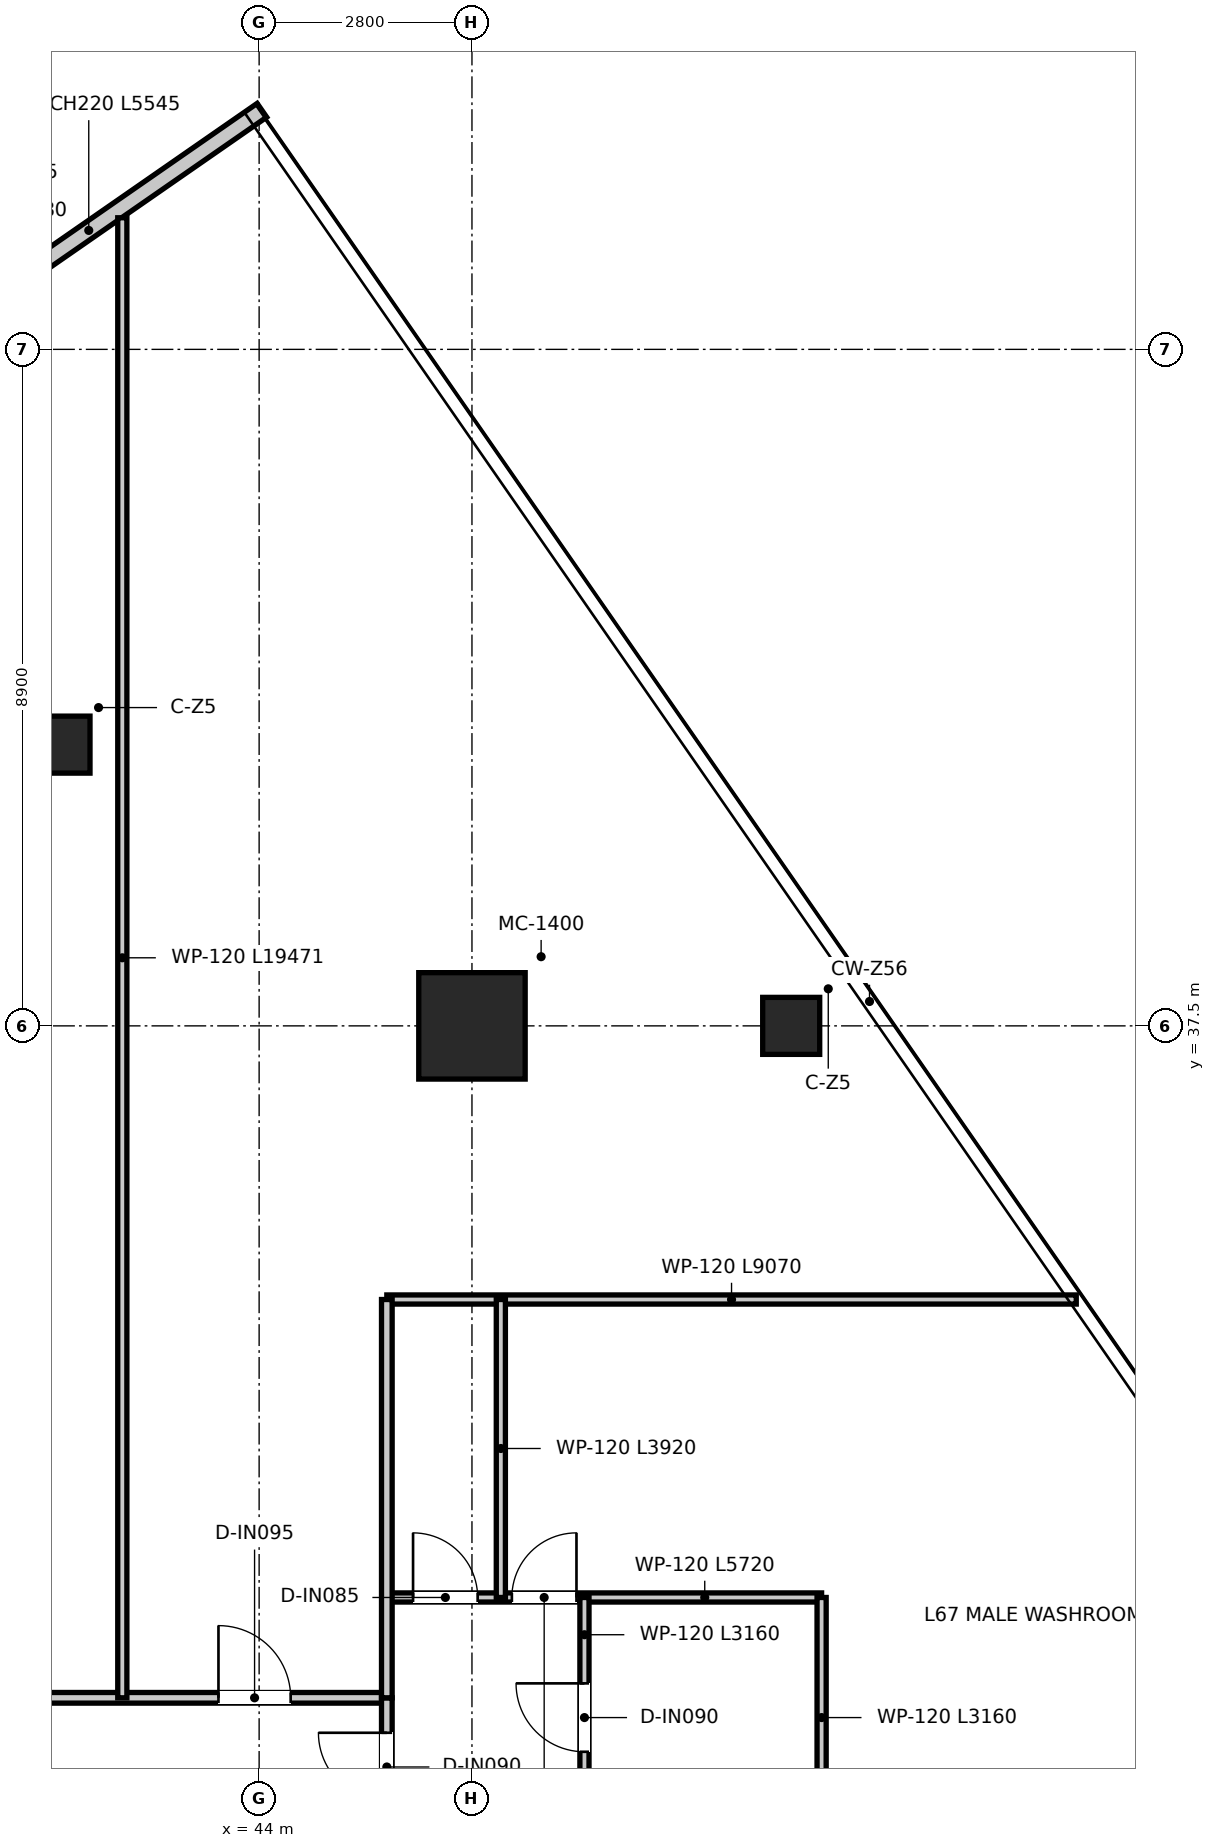
"""IFC4 building model, lengths in metres.
Left out: names, types, materials, properties, quantities, classifications, styles, units other than length and angle.
Written with IfcOpenShell. Run it as: python <this file> out.ifc"""

import sys

from ifc_helpers import new_model, si_unit, direction, frame, frame_2d, origin, origin_2d, place, context, subcontext, project, spatial, rectangle, extrude, source, transform, mapped, element, fill, save


model = new_model("IFC4")
c1 = context("Model", 3, precision=1e-05, world=origin(), true_north=direction((0.0, 1.0)))
c2 = subcontext(c1, "Body", "Model", "MODEL_VIEW")
j1 = project(units=[si_unit("LENGTHUNIT", "METRE"), si_unit("PLANEANGLEUNIT", "RADIAN")], contexts=[c1])
p1 = place(None, origin())
s1 = spatial("IfcSite", under=j1, at=p1, CompositionType="ELEMENT")
p2 = place(p1, origin())
s2 = spatial("IfcBuilding", under=s1, at=p2, CompositionType="ELEMENT")
p3 = place(p2, frame((0.0, 0.0, 275.3)))
s3 = spatial("IfcBuildingStorey", under=s2, at=p3, CompositionType="ELEMENT", Elevation=275.3)
m1 = source(origin(), c2, "Body", "SweptSolid", [
    extrude(rectangle(XDim=1.4, YDim=1.4, at=origin_2d()), origin(), (0.0, 0.0, 1.0), 3.95),
])
p4 = place(p3, frame((46.8, 37.5, 0.0), z_axis=(0.0, 0.0, 1.0), x_axis=(1.0, 0.0, 0.0)))
e1 = element("IfcColumn", 1, at=p4, inside=s3, PredefinedType="USERDEFINED", context=c2, shape_type="MappedRepresentation", body=[
    mapped(m1, transform((0.0, 0.0, 0.0), x_axis=(1.0, 0.0, 0.0), y_axis=(0.0, 1.0, 0.0), z_axis=(0.0, 0.0, 1.0), scale=1.0)),
])
m2 = source(origin(), c2, "Body", "SweptSolid", [
    extrude(rectangle(XDim=0.75, YDim=0.75, at=origin_2d()), origin(), (0.0, 0.0, 1.0), 3.95),
])
for number, where, z_axis, x_axis in (
    (2, (41.4, 41.2, 0.0), (0.0, 0.0, 1.0), (1.0, 0.0, 0.0)),
    (3, (51.0, 37.5, 0.0), (0.0, 0.0, 1.0), (1.0, 0.0, 0.0)),
):
    element("IfcColumn", number, at=place(p3, frame(where, z_axis=z_axis, x_axis=x_axis)), inside=s3, PredefinedType="COLUMN", context=c2, shape_type="MappedRepresentation", body=[
        mapped(m2, transform((0.0, 0.0, 0.0), x_axis=(1.0, 0.0, 0.0), y_axis=(0.0, 1.0, 0.0), z_axis=(0.0, 0.0, 1.0), scale=1.0)),
    ])
p5 = place(p3, frame((44.037, 49.545, 0.0), z_axis=(0.0, 0.0, 1.0), x_axis=(-0.821652918874, -0.569988141022, 0.0)))
e4 = element("IfcWall", 4, at=p5, inside=s3, PredefinedType="ELEMENTEDWALL", context=c2, shape_type="SweptSolid", body=[
    extrude(rectangle(XDim=5.545, YDim=0.22, at=frame_2d((2.772, 0.0))), origin(), (0.0, 0.0, 1.0), 3.67),
])
p6 = place(p3, frame((26.32, 28.66, 0.0), z_axis=(0.0, 0.0, 1.0), x_axis=(1.0, 0.0, 0.0)))
e5 = element("IfcWall", 5, at=p6, inside=s3, PredefinedType="PARTITIONING", context=c2, shape_type="SweptSolid", body=[
    extrude(rectangle(XDim=19.36, YDim=0.14, at=frame_2d((9.68, 0.0))), origin(), (0.0, 0.0, 1.0), 3.18),
])
p7 = place(p6, frame((1.265, 0.0, 0.0)))
e6 = element("IfcOpeningElement", 6, at=p7, cuts=e5, PredefinedType="OPENING", context=c2, shape_type="SweptSolid", body=[
    extrude(rectangle(XDim=0.95, YDim=2.1, at=frame_2d((0.475, 1.05))), frame((0.0, 0.08, 0.0), z_axis=(0.0, -1.0, 0.0), x_axis=(1.0, 0.0, 0.0)), (0.0, 0.0, 1.0), 0.16),
])
p8 = place(p6, frame((6.105, 0.0, 0.0)))
e7 = element("IfcOpeningElement", 7, at=p8, cuts=e5, PredefinedType="OPENING", context=c2, shape_type="SweptSolid", body=[
    extrude(rectangle(XDim=0.95, YDim=2.1, at=frame_2d((0.475, 1.05))), frame((0.0, 0.08, 0.0), z_axis=(0.0, -1.0, 0.0), x_axis=(1.0, 0.0, 0.0)), (0.0, 0.0, 1.0), 0.16),
])
p9 = place(p6, frame((12.305, 0.0, 0.0)))
e8 = element("IfcOpeningElement", 8, at=p9, cuts=e5, PredefinedType="OPENING", context=c2, shape_type="SweptSolid", body=[
    extrude(rectangle(XDim=0.95, YDim=2.1, at=frame_2d((0.475, 1.05))), frame((0.0, 0.08, 0.0), z_axis=(0.0, -1.0, 0.0), x_axis=(1.0, 0.0, 0.0)), (0.0, 0.0, 1.0), 0.16),
])
p10 = place(p6, frame((17.145, 0.0, 0.0)))
e9 = element("IfcOpeningElement", 9, at=p10, cuts=e5, PredefinedType="OPENING", context=c2, shape_type="SweptSolid", body=[
    extrude(rectangle(XDim=0.95, YDim=2.1, at=frame_2d((0.475, 1.05))), frame((0.0, 0.08, 0.0), z_axis=(0.0, -1.0, 0.0), x_axis=(1.0, 0.0, 0.0)), (0.0, 0.0, 1.0), 0.16),
])
p11 = place(p3, frame((45.68, 9.67, 0.0), z_axis=(0.0, 0.0, 1.0), x_axis=(0.0, 1.0, 0.0)))
e10 = element("IfcWall", 10, at=p11, inside=s3, PredefinedType="PARTITIONING", context=c2, shape_type="SweptSolid", body=[
    extrude(rectangle(XDim=18.99, YDim=0.14, at=frame_2d((9.495, 0.0))), origin(), (0.0, 0.0, 1.0), 3.13),
])
p12 = place(p11, frame((17.63, 0.0, 0.0)))
e11 = element("IfcOpeningElement", 11, at=p12, cuts=e10, PredefinedType="OPENING", context=c2, shape_type="SweptSolid", body=[
    extrude(rectangle(XDim=0.9, YDim=2.1, at=frame_2d((0.45, 1.05))), frame((0.0, 0.08, 0.0), z_axis=(0.0, -1.0, 0.0), x_axis=(1.0, 0.0, 0.0)), (0.0, 0.0, 1.0), 0.16),
])
p13 = place(p11, frame((1.13, 0.0, 0.0)))
e12 = element("IfcOpeningElement", 12, at=p13, cuts=e10, PredefinedType="OPENING", context=c2, shape_type="SweptSolid", body=[
    extrude(rectangle(XDim=0.9, YDim=2.1, at=frame_2d((0.45, 1.05))), frame((0.0, 0.08, 0.0), z_axis=(0.0, -1.0, 0.0), x_axis=(1.0, 0.0, 0.0)), (0.0, 0.0, 1.0), 0.16),
])
p14 = place(p11, frame((8.88, 0.0, 0.0)))
e13 = element("IfcOpeningElement", 13, at=p14, cuts=e10, PredefinedType="OPENING", context=c2, shape_type="SweptSolid", body=[
    extrude(rectangle(XDim=0.9, YDim=2.1, at=frame_2d((0.45, 1.05))), frame((0.0, 0.08, 0.0), z_axis=(0.0, -1.0, 0.0), x_axis=(1.0, 0.0, 0.0)), (0.0, 0.0, 1.0), 0.16),
])
p15 = place(p11, frame((13.54, 0.0, 0.0)))
e14 = element("IfcOpeningElement", 14, at=p15, cuts=e10, PredefinedType="OPENING", context=c2, shape_type="SweptSolid", body=[
    extrude(rectangle(XDim=0.9, YDim=2.1, at=frame_2d((0.45, 1.05))), frame((0.0, 0.08, 0.0), z_axis=(0.0, -1.0, 0.0), x_axis=(1.0, 0.0, 0.0)), (0.0, 0.0, 1.0), 0.16),
])
p16 = place(p3, frame((45.68, 33.9, 0.0), z_axis=(0.0, 0.0, 1.0), x_axis=(1.0, 0.0, 0.0)))
e15 = element("IfcWall", 15, at=p16, inside=s3, PredefinedType="PARTITIONING", context=c2, shape_type="SweptSolid", body=[
    extrude(rectangle(XDim=9.07, YDim=0.12, at=frame_2d((4.535, 0.0))), origin(), (0.0, 0.0, 1.0), 3.13),
])
p17 = place(p3, frame((45.68, 29.98, 0.0), z_axis=(0.0, 0.0, 1.0), x_axis=(1.0, 0.0, 0.0)))
e16 = element("IfcWall", 16, at=p17, inside=s3, PredefinedType="PARTITIONING", context=c2, shape_type="SweptSolid", body=[
    extrude(rectangle(XDim=5.72, YDim=0.12, at=frame_2d((2.86, 0.0))), origin(), (0.0, 0.0, 1.0), 3.13),
])
p18 = place(p17, frame((1.645, 0.0, 0.0)))
e17 = element("IfcOpeningElement", 17, at=p18, cuts=e16, PredefinedType="OPENING", context=c2, shape_type="SweptSolid", body=[
    extrude(rectangle(XDim=0.85, YDim=2.1, at=frame_2d((0.425, 1.05))), frame((0.0, 0.07, 0.0), z_axis=(0.0, -1.0, 0.0), x_axis=(1.0, 0.0, 0.0)), (0.0, 0.0, 1.0), 0.14),
])
p19 = place(p17, frame((0.345, 0.0, 0.0)))
e18 = element("IfcOpeningElement", 18, at=p19, cuts=e16, PredefinedType="OPENING", context=c2, shape_type="SweptSolid", body=[
    extrude(rectangle(XDim=0.85, YDim=2.1, at=frame_2d((0.425, 1.05))), frame((0.0, 0.07, 0.0), z_axis=(0.0, -1.0, 0.0), x_axis=(1.0, 0.0, 0.0)), (0.0, 0.0, 1.0), 0.14),
])
p20 = place(p3, frame((51.4, 26.82, 0.0), z_axis=(0.0, 0.0, 1.0), x_axis=(0.0, 1.0, 0.0)))
e19 = element("IfcWall", 19, at=p20, inside=s3, PredefinedType="PARTITIONING", context=c2, shape_type="SweptSolid", body=[
    extrude(rectangle(XDim=3.16, YDim=0.12, at=frame_2d((1.58, 0.0))), origin(), (0.0, 0.0, 1.0), 3.67),
])
p21 = place(p3, frame((48.28, 26.82, 0.0), z_axis=(0.0, 0.0, 1.0), x_axis=(0.0, 1.0, 0.0)))
e20 = element("IfcWall", 20, at=p21, inside=s3, PredefinedType="PARTITIONING", context=c2, shape_type="SweptSolid", body=[
    extrude(rectangle(XDim=3.16, YDim=0.12, at=frame_2d((1.58, 0.0))), origin(), (0.0, 0.0, 1.0), 3.18),
])
p22 = place(p21, frame((1.13, 0.0, 0.0)))
e21 = element("IfcOpeningElement", 21, at=p22, cuts=e20, PredefinedType="OPENING", context=c2, shape_type="SweptSolid", body=[
    extrude(rectangle(XDim=0.9, YDim=2.1, at=frame_2d((0.45, 1.05))), frame((0.0, 0.07, 0.0), z_axis=(0.0, -1.0, 0.0), x_axis=(1.0, 0.0, 0.0)), (0.0, 0.0, 1.0), 0.14),
])
p23 = place(p3, frame((47.18, 29.98, 0.0), z_axis=(0.0, 0.0, 1.0), x_axis=(0.0, 1.0, 0.0)))
e22 = element("IfcWall", 22, at=p23, inside=s3, PredefinedType="PARTITIONING", context=c2, shape_type="SweptSolid", body=[
    extrude(rectangle(XDim=3.92, YDim=0.12, at=frame_2d((1.96, 0.0))), origin(), (0.0, 0.0, 1.0), 3.31),
])
p24 = place(p3, frame((45.68, 28.66, 0.0), z_axis=(0.0, 0.0, 1.0), x_axis=(0.0, 1.0, 0.0)))
e23 = element("IfcWall", 23, at=p24, inside=s3, PredefinedType="PARTITIONING", context=c2, shape_type="SweptSolid", body=[
    extrude(rectangle(XDim=5.24, YDim=0.14, at=frame_2d((2.62, 0.0))), origin(), (0.0, 0.0, 1.0), 3.43),
])
p25 = place(p3, frame((42.2, 28.66, 0.0), z_axis=(0.0, 0.0, 1.0), x_axis=(0.0, 1.0, 0.0)))
e24 = element("IfcWall", 24, at=p25, inside=s3, PredefinedType="PARTITIONING", context=c2, shape_type="SweptSolid", body=[
    extrude(rectangle(XDim=19.471, YDim=0.12, at=frame_2d((9.736, 0.0))), origin(), (0.0, 0.0, 1.0), 3.13),
])
p26 = place(p12, origin())
e25 = element("IfcDoor", 25, at=p26, inside=s3, OperationType="SINGLE_SWING_RIGHT", PredefinedType="DOOR", context=c2, shape_type="SweptSolid", body=[
    extrude(rectangle(XDim=0.9, YDim=2.1, at=frame_2d((0.45, 1.05))), frame((0.0, 0.025, 0.0), z_axis=(0.0, -1.0, 0.0), x_axis=(1.0, 0.0, 0.0)), (0.0, 0.0, 1.0), 0.05),
])
fill(e11, e25)
p27 = place(p18, origin())
e26 = element("IfcDoor", 26, at=p27, inside=s3, OperationType="SINGLE_SWING_RIGHT", PredefinedType="DOOR", context=c2, shape_type="SweptSolid", body=[
    extrude(rectangle(XDim=0.85, YDim=2.1, at=frame_2d((0.425, 1.05))), frame((0.0, 0.025, 0.0), z_axis=(0.0, -1.0, 0.0), x_axis=(1.0, 0.0, 0.0)), (0.0, 0.0, 1.0), 0.05),
])
fill(e17, e26)
p28 = place(p19, origin())
e27 = element("IfcDoor", 27, at=p28, inside=s3, OperationType="SINGLE_SWING_LEFT", PredefinedType="DOOR", context=c2, shape_type="SweptSolid", body=[
    extrude(rectangle(XDim=0.85, YDim=2.1, at=frame_2d((0.425, 1.05))), frame((0.0, 0.025, 0.0), z_axis=(0.0, -1.0, 0.0), x_axis=(1.0, 0.0, 0.0)), (0.0, 0.0, 1.0), 0.05),
])
fill(e18, e27)
p29 = place(p22, origin())
e28 = element("IfcDoor", 28, at=p29, inside=s3, OperationType="SINGLE_SWING_RIGHT", PredefinedType="DOOR", context=c2, shape_type="SweptSolid", body=[
    extrude(rectangle(XDim=0.9, YDim=2.1, at=frame_2d((0.45, 1.05))), frame((0.0, 0.025, 0.0), z_axis=(0.0, -1.0, 0.0), x_axis=(1.0, 0.0, 0.0)), (0.0, 0.0, 1.0), 0.05),
])
fill(e21, e28)
p30 = place(p10, origin())
e29 = element("IfcDoor", 29, at=p30, inside=s3, OperationType="SINGLE_SWING_LEFT", PredefinedType="DOOR", context=c2, shape_type="SweptSolid", body=[
    extrude(rectangle(XDim=0.95, YDim=2.1, at=frame_2d((0.475, 1.05))), frame((0.0, 0.025, 0.0), z_axis=(0.0, -1.0, 0.0), x_axis=(1.0, 0.0, 0.0)), (0.0, 0.0, 1.0), 0.05),
])
fill(e9, e29)
save(model, sys.argv[1])
